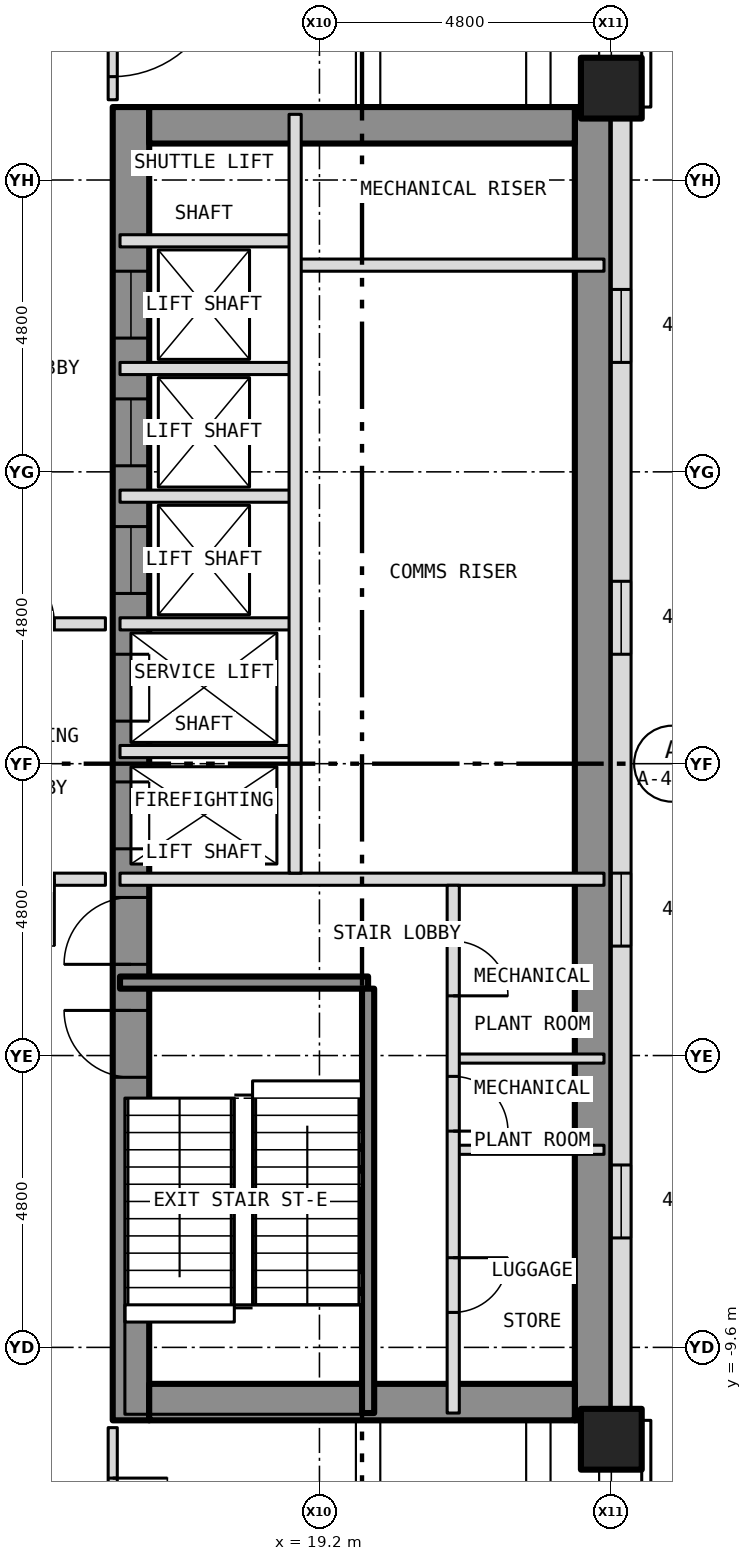
"""IFC4 building model, lengths in metres.
Left out: names, types, materials, properties, quantities, classifications, styles, units other than length and angle.
Written with IfcOpenShell. Run it as: python <this file> out.ifc"""

import sys

from ifc_helpers import new_model, si_unit, direction, frame, frame_2d, origin, origin_2d, place, context, subcontext, project, spatial, rectangle, hollow_rectangle, extrude, element, fill, save


model = new_model("IFC4")
c1 = context("Model", 3, precision=1e-05, world=origin(), true_north=direction((0.0, 1.0)))
c2 = subcontext(c1, "Body", "Model", "MODEL_VIEW")
j1 = project(units=[si_unit("LENGTHUNIT", "METRE"), si_unit("PLANEANGLEUNIT", "RADIAN")], contexts=[c1])
p1 = place(None, origin())
s1 = spatial("IfcSite", under=j1, at=p1, CompositionType="ELEMENT")
p2 = place(p1, origin())
s2 = spatial("IfcBuilding", under=s1, at=p2, CompositionType="ELEMENT")
p3 = place(p2, frame((0.0, 0.0, 84.5)))
s3 = spatial("IfcBuildingStorey", under=s2, at=p3, CompositionType="ELEMENT", Elevation=84.5)
for number, where, z_axis, x_axis in (
    (1, (24.0, -11.111, -0.3), (0.0, 0.0, 1.0), (1.0, 0.0, 0.0)),
    (2, (24.0, 11.111, -0.3), (0.0, 0.0, 1.0), (1.0, 0.0, 0.0)),
):
    element("IfcColumn", number, at=place(p3, frame(where, z_axis=z_axis, x_axis=x_axis)), inside=s3, PredefinedType="COLUMN", context=c2, shape_type="SweptSolid", body=[
        extrude(hollow_rectangle(XDim=1.0, YDim=1.0, WallThickness=0.06, at=origin_2d()), origin(), (0.0, 0.0, 1.0), 4.65),
    ])
p4 = place(p3, frame((16.1, -10.8, 0.0), z_axis=(0.0, 0.0, 1.0), x_axis=(0.0, 1.0, 0.0)))
e3 = element("IfcWall", 3, at=p4, inside=s3, PredefinedType="SHEAR", context=c2, shape_type="SweptSolid", body=[
    extrude(rectangle(XDim=21.6, YDim=0.6, at=frame_2d((10.8, 0.0))), origin(), (0.0, 0.0, 1.0), 3.9),
])
p5 = place(p4, frame((9.4, 0.0, 0.0)))
e4 = element("IfcOpeningElement", 4, at=p5, cuts=e3, PredefinedType="OPENING", context=c2, shape_type="SweptSolid", body=[
    extrude(rectangle(XDim=1.1, YDim=2.1, at=frame_2d((0.55, 1.05))), frame((0.0, 0.312, 0.0), z_axis=(0.0, -1.0, 0.0), x_axis=(1.0, 0.0, 0.0)), (0.0, 0.0, 1.0), 0.624),
])
p6 = place(p4, frame((11.5, 0.0, 0.0)))
e5 = element("IfcOpeningElement", 5, at=p6, cuts=e3, PredefinedType="OPENING", context=c2, shape_type="SweptSolid", body=[
    extrude(rectangle(XDim=1.1, YDim=2.1, at=frame_2d((0.55, 1.05))), frame((0.0, 0.312, 0.0), z_axis=(0.0, -1.0, 0.0), x_axis=(1.0, 0.0, 0.0)), (0.0, 0.0, 1.0), 0.624),
])
p7 = place(p4, frame((13.6, 0.0, 0.0)))
e6 = element("IfcOpeningElement", 6, at=p7, cuts=e3, PredefinedType="OPENING", context=c2, shape_type="SweptSolid", body=[
    extrude(rectangle(XDim=1.1, YDim=2.1, at=frame_2d((0.55, 1.05))), frame((0.0, 0.312, 0.0), z_axis=(0.0, -1.0, 0.0), x_axis=(1.0, 0.0, 0.0)), (0.0, 0.0, 1.0), 0.624),
])
p8 = place(p4, frame((15.7, 0.0, 0.0)))
e7 = element("IfcOpeningElement", 7, at=p8, cuts=e3, PredefinedType="OPENING", context=c2, shape_type="SweptSolid", body=[
    extrude(rectangle(XDim=1.1, YDim=2.1, at=frame_2d((0.55, 1.05))), frame((0.0, 0.312, 0.0), z_axis=(0.0, -1.0, 0.0), x_axis=(1.0, 0.0, 0.0)), (0.0, 0.0, 1.0), 0.624),
])
p9 = place(p4, frame((17.8, 0.0, 0.0)))
e8 = element("IfcOpeningElement", 8, at=p9, cuts=e3, PredefinedType="OPENING", context=c2, shape_type="SweptSolid", body=[
    extrude(rectangle(XDim=1.1, YDim=2.1, at=frame_2d((0.55, 1.05))), frame((0.0, 0.312, 0.0), z_axis=(0.0, -1.0, 0.0), x_axis=(1.0, 0.0, 0.0)), (0.0, 0.0, 1.0), 0.624),
])
p10 = place(p4, frame((5.642, 0.0, 0.0)))
e9 = element("IfcOpeningElement", 9, at=p10, cuts=e3, PredefinedType="OPENING", context=c2, shape_type="SweptSolid", body=[
    extrude(rectangle(XDim=1.1, YDim=2.1, at=frame_2d((0.55, 1.05))), frame((0.0, 0.312, 0.0), z_axis=(0.0, -1.0, 0.0), x_axis=(1.0, 0.0, 0.0)), (0.0, 0.0, 1.0), 0.624),
])
p11 = place(p4, frame((7.5, 0.0, 0.0)))
e10 = element("IfcOpeningElement", 10, at=p11, cuts=e3, PredefinedType="OPENING", context=c2, shape_type="SweptSolid", body=[
    extrude(rectangle(XDim=1.1, YDim=2.1, at=frame_2d((0.55, 1.05))), frame((0.0, 0.312, 0.0), z_axis=(0.0, -1.0, 0.0), x_axis=(1.0, 0.0, 0.0)), (0.0, 0.0, 1.0), 0.624),
])
p12 = place(p3, frame((23.7, -10.8, 0.0), z_axis=(0.0, 0.0, 1.0), x_axis=(0.0, 1.0, 0.0)))
e11 = element("IfcWall", 11, at=p12, inside=s3, PredefinedType="SHEAR", context=c2, shape_type="SweptSolid", body=[
    extrude(rectangle(XDim=21.6, YDim=0.6, at=frame_2d((10.8, 0.0))), origin(), (0.0, 0.0, 1.0), 3.9),
])
for number, where, z_axis, x_axis in (
    (12, (16.4, 10.5, 0.0), (0.0, 0.0, 1.0), (1.0, 0.0, 0.0)),
    (13, (16.4, -10.5, 0.0), (0.0, 0.0, 1.0), (1.0, 0.0, 0.0)),
):
    element("IfcWall", number, at=place(p3, frame(where, z_axis=z_axis, x_axis=x_axis)), inside=s3, PredefinedType="SHEAR", context=c2, shape_type="SweptSolid", body=[
        extrude(rectangle(XDim=7.0, YDim=0.6, at=frame_2d((3.5, 0.0))), origin(), (0.0, 0.0, 1.0), 3.9),
    ])
p13 = place(p3, frame((24.163, -10.8, 0.0), z_axis=(0.0, 0.0, 1.0), x_axis=(0.0, 1.0, 0.0)))
e14 = element("IfcWall", 14, at=p13, inside=s3, PredefinedType="SOLIDWALL", context=c2, shape_type="SweptSolid", body=[
    extrude(rectangle(XDim=21.6, YDim=0.325, at=frame_2d((10.8, 0.0))), origin(), (0.0, 0.0, 1.0), 4.5),
])
p14 = place(p13, frame((3.0, 0.0, 2.2)))
e15 = element("IfcOpeningElement", 15, at=p14, cuts=e14, PredefinedType="OPENING", context=c2, shape_type="SweptSolid", body=[
    extrude(rectangle(XDim=1.2, YDim=0.6, at=frame_2d((0.6, 0.3))), frame((0.0, 0.175, 0.0), z_axis=(0.0, -1.0, 0.0), x_axis=(1.0, 0.0, 0.0)), (0.0, 0.0, 1.0), 0.349),
])
p15 = place(p13, frame((7.8, 0.0, 2.2)))
e16 = element("IfcOpeningElement", 16, at=p15, cuts=e14, PredefinedType="OPENING", context=c2, shape_type="SweptSolid", body=[
    extrude(rectangle(XDim=1.2, YDim=0.6, at=frame_2d((0.6, 0.3))), frame((0.0, 0.175, 0.0), z_axis=(0.0, -1.0, 0.0), x_axis=(1.0, 0.0, 0.0)), (0.0, 0.0, 1.0), 0.349),
])
p16 = place(p13, frame((12.6, 0.0, 2.2)))
e17 = element("IfcOpeningElement", 17, at=p16, cuts=e14, PredefinedType="OPENING", context=c2, shape_type="SweptSolid", body=[
    extrude(rectangle(XDim=1.2, YDim=0.6, at=frame_2d((0.6, 0.3))), frame((0.0, 0.175, 0.0), z_axis=(0.0, -1.0, 0.0), x_axis=(1.0, 0.0, 0.0)), (0.0, 0.0, 1.0), 0.349),
])
p17 = place(p13, frame((17.4, 0.0, 2.2)))
e18 = element("IfcOpeningElement", 18, at=p17, cuts=e14, PredefinedType="OPENING", context=c2, shape_type="SweptSolid", body=[
    extrude(rectangle(XDim=1.2, YDim=0.6, at=frame_2d((0.6, 0.3))), frame((0.0, 0.175, 0.0), z_axis=(0.0, -1.0, 0.0), x_axis=(1.0, 0.0, 0.0)), (0.0, 0.0, 1.0), 0.349),
])
for number, where, z_axis, x_axis in (
    (19, (21.4, -6.35, 0.0), (0.0, 0.0, 1.0), (1.0, 0.0, 0.0)),
    (20, (21.4, -4.85, 0.0), (0.0, 0.0, 1.0), (1.0, 0.0, 0.0)),
):
    element("IfcWall", number, at=place(p3, frame(where, z_axis=z_axis, x_axis=x_axis)), inside=s3, PredefinedType="PARTITIONING", context=c2, shape_type="SweptSolid", body=[
        extrude(rectangle(XDim=2.48, YDim=0.15, at=frame_2d((1.24, 0.0))), origin(), (0.0, 0.0, 1.0), 3.9),
    ])
p18 = place(p3, frame((15.92, -3.6, 0.0), z_axis=(0.0, 0.0, 1.0), x_axis=(1.0, 0.0, 0.0)))
e21 = element("IfcWall", 21, at=p18, inside=s3, PredefinedType="SHEAR", context=c2, shape_type="SweptSolid", body=[
    extrude(rectangle(XDim=4.08, YDim=0.2, at=frame_2d((2.04, 0.0))), origin(), (0.0, 0.0, 1.0), 3.9),
])
p19 = place(p3, frame((12.4, -1.9, 0.0), z_axis=(0.0, 0.0, 1.0), x_axis=(1.0, 0.0, 0.0)))
e22 = element("IfcWall", 22, at=p19, inside=s3, PredefinedType="PARTITIONING", context=c2, shape_type="SweptSolid", body=[
    extrude(rectangle(XDim=3.28, YDim=0.2, at=frame_2d((1.64, 0.0))), origin(), (0.0, 0.0, 1.0), 4.35),
])
p20 = place(p19, frame((1.34, 0.0, 0.0)))
e23 = element("IfcOpeningElement", 23, at=p20, cuts=e22, PredefinedType="OPENING", context=c2, shape_type="SweptSolid", body=[
    extrude(rectangle(XDim=1.1, YDim=2.1, at=frame_2d((0.55, 1.05))), frame((0.0, 0.112, 0.0), z_axis=(0.0, -1.0, 0.0), x_axis=(1.0, 0.0, 0.0)), (0.0, 0.0, 1.0), 0.224),
])
p21 = place(p3, frame((15.92, -1.9, 0.0), z_axis=(0.0, 0.0, 1.0), x_axis=(1.0, 0.0, 0.0)))
e24 = element("IfcWall", 24, at=p21, inside=s3, PredefinedType="PARTITIONING", context=c2, shape_type="SweptSolid", body=[
    extrude(rectangle(XDim=7.96, YDim=0.2, at=frame_2d((3.98, 0.0))), origin(), (0.0, 0.0, 1.0), 3.9),
])
p22 = place(p3, frame((15.92, 0.2, 0.0), z_axis=(0.0, 0.0, 1.0), x_axis=(1.0, 0.0, 0.0)))
e25 = element("IfcWall", 25, at=p22, inside=s3, PredefinedType="PARTITIONING", context=c2, shape_type="SweptSolid", body=[
    extrude(rectangle(XDim=2.88, YDim=0.2, at=frame_2d((1.44, 0.0))), origin(), (0.0, 0.0, 1.0), 3.9),
])
p23 = place(p3, frame((12.4, 2.3, 0.0), z_axis=(0.0, 0.0, 1.0), x_axis=(1.0, 0.0, 0.0)))
e26 = element("IfcWall", 26, at=p23, inside=s3, PredefinedType="PARTITIONING", context=c2, shape_type="SweptSolid", body=[
    extrude(rectangle(XDim=3.28, YDim=0.2, at=frame_2d((1.64, 0.0))), origin(), (0.0, 0.0, 1.0), 4.35),
])
p24 = place(p23, frame((1.34, 0.0, 0.0)))
e27 = element("IfcOpeningElement", 27, at=p24, cuts=e26, PredefinedType="OPENING", context=c2, shape_type="SweptSolid", body=[
    extrude(rectangle(XDim=1.1, YDim=2.1, at=frame_2d((0.55, 1.05))), frame((0.0, 0.112, 0.0), z_axis=(0.0, -1.0, 0.0), x_axis=(1.0, 0.0, 0.0)), (0.0, 0.0, 1.0), 0.224),
])
for number, where, z_axis, x_axis in (
    (28, (15.92, 2.3, 0.0), (0.0, 0.0, 1.0), (1.0, 0.0, 0.0)),
    (29, (15.92, 4.4, 0.0), (0.0, 0.0, 1.0), (1.0, 0.0, 0.0)),
    (30, (15.92, 6.5, 0.0), (0.0, 0.0, 1.0), (1.0, 0.0, 0.0)),
):
    element("IfcWall", number, at=place(p3, frame(where, z_axis=z_axis, x_axis=x_axis)), inside=s3, PredefinedType="PARTITIONING", context=c2, shape_type="SweptSolid", body=[
        extrude(rectangle(XDim=2.88, YDim=0.2, at=frame_2d((1.44, 0.0))), origin(), (0.0, 0.0, 1.0), 3.9),
    ])
p25 = place(p3, frame((18.8, 8.2, 0.0), z_axis=(0.0, 0.0, 1.0), x_axis=(1.0, 0.0, 0.0)))
e31 = element("IfcWall", 31, at=p25, inside=s3, PredefinedType="PARTITIONING", context=c2, shape_type="SweptSolid", body=[
    extrude(rectangle(XDim=5.08, YDim=0.2, at=frame_2d((2.54, 0.0))), origin(), (0.0, 0.0, 1.0), 3.9),
])
p26 = place(p3, frame((15.92, 8.6, 0.0), z_axis=(0.0, 0.0, 1.0), x_axis=(1.0, 0.0, 0.0)))
e32 = element("IfcWall", 32, at=p26, inside=s3, PredefinedType="PARTITIONING", context=c2, shape_type="SweptSolid", body=[
    extrude(rectangle(XDim=2.88, YDim=0.2, at=frame_2d((1.44, 0.0))), origin(), (0.0, 0.0, 1.0), 3.9),
])
p27 = place(p3, frame((15.8, -15.725, 0.0), z_axis=(0.0, 0.0, 1.0), x_axis=(0.0, 1.0, 0.0)))
e33 = element("IfcWall", 33, at=p27, inside=s3, PredefinedType="PARTITIONING", context=c2, shape_type="SweptSolid", body=[
    extrude(rectangle(XDim=4.805, YDim=0.15, at=frame_2d((2.403, 0.0))), origin(), (0.0, 0.0, 1.0), 4.35),
])
p28 = place(p27, frame((3.075, 0.0, 0.0)))
e34 = element("IfcOpeningElement", 34, at=p28, cuts=e33, PredefinedType="OPENING", context=c2, shape_type="SweptSolid", body=[
    extrude(rectangle(XDim=0.9, YDim=2.1, at=frame_2d((0.45, 1.05))), frame((0.0, 0.087, 0.0), z_axis=(0.0, -1.0, 0.0), x_axis=(1.0, 0.0, 0.0)), (0.0, 0.0, 1.0), 0.174),
])
p29 = place(p3, frame((15.8, 10.92, 0.0), z_axis=(0.0, 0.0, 1.0), x_axis=(0.0, 1.0, 0.0)))
e35 = element("IfcWall", 35, at=p29, inside=s3, PredefinedType="PARTITIONING", context=c2, shape_type="SweptSolid", body=[
    extrude(rectangle(XDim=4.805, YDim=0.15, at=frame_2d((2.403, 0.0))), origin(), (0.0, 0.0, 1.0), 4.35),
])
p30 = place(p29, frame((0.38, 0.0, 0.0)))
e36 = element("IfcOpeningElement", 36, at=p30, cuts=e35, PredefinedType="OPENING", context=c2, shape_type="SweptSolid", body=[
    extrude(rectangle(XDim=1.8, YDim=2.1, at=frame_2d((0.9, 1.05))), frame((0.0, 0.087, 0.0), z_axis=(0.0, -1.0, 0.0), x_axis=(1.0, 0.0, 0.0)), (0.0, 0.0, 1.0), 0.174),
])
p31 = place(p3, frame((18.8, -1.8, 0.0), z_axis=(0.0, 0.0, 1.0), x_axis=(0.0, 1.0, 0.0)))
e37 = element("IfcWall", 37, at=p31, inside=s3, PredefinedType="PARTITIONING", context=c2, shape_type="SweptSolid", body=[
    extrude(rectangle(XDim=12.48, YDim=0.2, at=frame_2d((6.24, 0.0))), origin(), (0.0, 0.0, 1.0), 3.9),
])
p32 = place(p3, frame((20.0, -10.68, 0.0), z_axis=(0.0, 0.0, 1.0), x_axis=(0.0, 1.0, 0.0)))
e38 = element("IfcWall", 38, at=p32, inside=s3, PredefinedType="SHEAR", context=c2, shape_type="SweptSolid", body=[
    extrude(rectangle(XDim=6.98, YDim=0.2, at=frame_2d((3.49, 0.0))), origin(), (0.0, 0.0, 1.0), 3.9),
])
p33 = place(p3, frame((21.4, -10.68, 0.0), z_axis=(0.0, 0.0, 1.0), x_axis=(0.0, 1.0, 0.0)))
e39 = element("IfcWall", 39, at=p33, inside=s3, PredefinedType="PARTITIONING", context=c2, shape_type="SweptSolid", body=[
    extrude(rectangle(XDim=8.68, YDim=0.2, at=frame_2d((4.34, 0.0))), origin(), (0.0, 0.0, 1.0), 3.9),
])
p34 = place(p33, frame((1.655, 0.0, 0.0)))
e40 = element("IfcOpeningElement", 40, at=p34, cuts=e39, PredefinedType="OPENING", context=c2, shape_type="SweptSolid", body=[
    extrude(rectangle(XDim=0.9, YDim=2.1, at=frame_2d((0.45, 1.05))), frame((0.0, 0.112, 0.0), z_axis=(0.0, -1.0, 0.0), x_axis=(1.0, 0.0, 0.0)), (0.0, 0.0, 1.0), 0.224),
])
p35 = place(p33, frame((4.637, 0.0, 0.0)))
e41 = element("IfcOpeningElement", 41, at=p35, cuts=e39, PredefinedType="OPENING", context=c2, shape_type="SweptSolid", body=[
    extrude(rectangle(XDim=0.9, YDim=2.1, at=frame_2d((0.45, 1.05))), frame((0.0, 0.112, 0.0), z_axis=(0.0, -1.0, 0.0), x_axis=(1.0, 0.0, 0.0)), (0.0, 0.0, 1.0), 0.224),
])
p36 = place(p33, frame((6.862, 0.0, 0.0)))
e42 = element("IfcOpeningElement", 42, at=p36, cuts=e39, PredefinedType="OPENING", context=c2, shape_type="SweptSolid", body=[
    extrude(rectangle(XDim=0.9, YDim=2.1, at=frame_2d((0.45, 1.05))), frame((0.0, 0.112, 0.0), z_axis=(0.0, -1.0, 0.0), x_axis=(1.0, 0.0, 0.0)), (0.0, 0.0, 1.0), 0.224),
])
p37 = place(p14, origin())
e43 = element("IfcWindow", 43, at=p37, inside=s3, PartitioningType="SINGLE_PANEL", PredefinedType="WINDOW", context=c2, shape_type="SweptSolid", body=[
    extrude(rectangle(XDim=1.2, YDim=0.6, at=frame_2d((0.6, 0.3))), frame((0.0, -0.073, 0.0), z_axis=(0.0, -1.0, 0.0), x_axis=(1.0, 0.0, 0.0)), (0.0, 0.0, 1.0), 0.06),
])
fill(e15, e43)
p38 = place(p15, origin())
e44 = element("IfcWindow", 44, at=p38, inside=s3, PartitioningType="SINGLE_PANEL", PredefinedType="WINDOW", context=c2, shape_type="SweptSolid", body=[
    extrude(rectangle(XDim=1.2, YDim=0.6, at=frame_2d((0.6, 0.3))), frame((0.0, -0.073, 0.0), z_axis=(0.0, -1.0, 0.0), x_axis=(1.0, 0.0, 0.0)), (0.0, 0.0, 1.0), 0.06),
])
fill(e16, e44)
p39 = place(p16, origin())
e45 = element("IfcWindow", 45, at=p39, inside=s3, PartitioningType="SINGLE_PANEL", PredefinedType="WINDOW", context=c2, shape_type="SweptSolid", body=[
    extrude(rectangle(XDim=1.2, YDim=0.6, at=frame_2d((0.6, 0.3))), frame((0.0, -0.073, 0.0), z_axis=(0.0, -1.0, 0.0), x_axis=(1.0, 0.0, 0.0)), (0.0, 0.0, 1.0), 0.06),
])
fill(e17, e45)
p40 = place(p17, origin())
e46 = element("IfcWindow", 46, at=p40, inside=s3, PartitioningType="SINGLE_PANEL", PredefinedType="WINDOW", context=c2, shape_type="SweptSolid", body=[
    extrude(rectangle(XDim=1.2, YDim=0.6, at=frame_2d((0.6, 0.3))), frame((0.0, -0.073, 0.0), z_axis=(0.0, -1.0, 0.0), x_axis=(1.0, 0.0, 0.0)), (0.0, 0.0, 1.0), 0.06),
])
fill(e18, e46)
p41 = place(p5, origin())
e47 = element("IfcDoor", 47, at=p41, inside=s3, OperationType="SLIDING_TO_LEFT", PredefinedType="DOOR", context=c2, shape_type="SweptSolid", body=[
    extrude(rectangle(XDim=1.1, YDim=2.1, at=frame_2d((0.55, 1.05))), frame((0.0, 0.025, 0.0), z_axis=(0.0, -1.0, 0.0), x_axis=(1.0, 0.0, 0.0)), (0.0, 0.0, 1.0), 0.05),
])
fill(e4, e47)
p42 = place(p6, origin())
e48 = element("IfcDoor", 48, at=p42, inside=s3, OperationType="SLIDING_TO_LEFT", PredefinedType="DOOR", context=c2, shape_type="SweptSolid", body=[
    extrude(rectangle(XDim=1.1, YDim=2.1, at=frame_2d((0.55, 1.05))), frame((0.0, 0.025, 0.0), z_axis=(0.0, -1.0, 0.0), x_axis=(1.0, 0.0, 0.0)), (0.0, 0.0, 1.0), 0.05),
])
fill(e5, e48)
p43 = place(p7, origin())
e49 = element("IfcDoor", 49, at=p43, inside=s3, OperationType="SLIDING_TO_LEFT", PredefinedType="DOOR", context=c2, shape_type="SweptSolid", body=[
    extrude(rectangle(XDim=1.1, YDim=2.1, at=frame_2d((0.55, 1.05))), frame((0.0, 0.025, 0.0), z_axis=(0.0, -1.0, 0.0), x_axis=(1.0, 0.0, 0.0)), (0.0, 0.0, 1.0), 0.05),
])
fill(e6, e49)
p44 = place(p8, origin())
e50 = element("IfcDoor", 50, at=p44, inside=s3, OperationType="SLIDING_TO_LEFT", PredefinedType="DOOR", context=c2, shape_type="SweptSolid", body=[
    extrude(rectangle(XDim=1.1, YDim=2.1, at=frame_2d((0.55, 1.05))), frame((0.0, 0.025, 0.0), z_axis=(0.0, -1.0, 0.0), x_axis=(1.0, 0.0, 0.0)), (0.0, 0.0, 1.0), 0.05),
])
fill(e7, e50)
p45 = place(p9, origin())
e51 = element("IfcDoor", 51, at=p45, inside=s3, OperationType="SLIDING_TO_LEFT", PredefinedType="DOOR", context=c2, shape_type="SweptSolid", body=[
    extrude(rectangle(XDim=1.1, YDim=2.1, at=frame_2d((0.55, 1.05))), frame((0.0, 0.025, 0.0), z_axis=(0.0, -1.0, 0.0), x_axis=(1.0, 0.0, 0.0)), (0.0, 0.0, 1.0), 0.05),
])
fill(e8, e51)
p46 = place(p10, origin())
e52 = element("IfcDoor", 52, at=p46, inside=s3, OperationType="SINGLE_SWING_RIGHT", PredefinedType="DOOR", context=c2, shape_type="SweptSolid", body=[
    extrude(rectangle(XDim=1.1, YDim=2.1, at=frame_2d((0.55, 1.05))), frame((0.0, 0.025, 0.0), z_axis=(0.0, -1.0, 0.0), x_axis=(1.0, 0.0, 0.0)), (0.0, 0.0, 1.0), 0.05),
])
fill(e9, e52)
p47 = place(p11, origin())
e53 = element("IfcDoor", 53, at=p47, inside=s3, OperationType="SINGLE_SWING_LEFT", PredefinedType="DOOR", context=c2, shape_type="SweptSolid", body=[
    extrude(rectangle(XDim=1.1, YDim=2.1, at=frame_2d((0.55, 1.05))), frame((0.0, 0.025, 0.0), z_axis=(0.0, -1.0, 0.0), x_axis=(1.0, 0.0, 0.0)), (0.0, 0.0, 1.0), 0.05),
])
fill(e10, e53)
p48 = place(p34, origin())
e54 = element("IfcDoor", 54, at=p48, inside=s3, OperationType="SINGLE_SWING_RIGHT", PredefinedType="DOOR", context=c2, shape_type="SweptSolid", body=[
    extrude(rectangle(XDim=0.9, YDim=2.1, at=frame_2d((0.45, 1.05))), frame((0.0, 0.025, 0.0), z_axis=(0.0, -1.0, 0.0), x_axis=(1.0, 0.0, 0.0)), (0.0, 0.0, 1.0), 0.05),
])
fill(e40, e54)
p49 = place(p35, origin())
e55 = element("IfcDoor", 55, at=p49, inside=s3, OperationType="SINGLE_SWING_LEFT", PredefinedType="DOOR", context=c2, shape_type="SweptSolid", body=[
    extrude(rectangle(XDim=0.9, YDim=2.1, at=frame_2d((0.45, 1.05))), frame((0.0, 0.025, 0.0), z_axis=(0.0, -1.0, 0.0), x_axis=(1.0, 0.0, 0.0)), (0.0, 0.0, 1.0), 0.05),
])
fill(e41, e55)
p50 = place(p36, origin())
e56 = element("IfcDoor", 56, at=p50, inside=s3, OperationType="SINGLE_SWING_LEFT", PredefinedType="DOOR", context=c2, shape_type="SweptSolid", body=[
    extrude(rectangle(XDim=0.9, YDim=2.1, at=frame_2d((0.45, 1.05))), frame((0.0, 0.025, 0.0), z_axis=(0.0, -1.0, 0.0), x_axis=(1.0, 0.0, 0.0)), (0.0, 0.0, 1.0), 0.05),
])
fill(e42, e56)
p51 = place(p24, origin())
e57 = element("IfcDoor", 57, at=p51, inside=s3, OperationType="SINGLE_SWING_LEFT", PredefinedType="DOOR", context=c2, shape_type="SweptSolid", body=[
    extrude(rectangle(XDim=1.1, YDim=2.1, at=frame_2d((0.55, 1.05))), frame((0.0, 0.025, 0.0), z_axis=(0.0, -1.0, 0.0), x_axis=(1.0, 0.0, 0.0)), (0.0, 0.0, 1.0), 0.05),
])
fill(e27, e57)
p52 = place(p20, origin())
e58 = element("IfcDoor", 58, at=p52, inside=s3, OperationType="SINGLE_SWING_RIGHT", PredefinedType="DOOR", context=c2, shape_type="SweptSolid", body=[
    extrude(rectangle(XDim=1.1, YDim=2.1, at=frame_2d((0.55, 1.05))), frame((0.0, 0.025, 0.0), z_axis=(0.0, -1.0, 0.0), x_axis=(1.0, 0.0, 0.0)), (0.0, 0.0, 1.0), 0.05),
])
fill(e23, e58)
p53 = place(p28, origin())
e59 = element("IfcDoor", 59, at=p53, inside=s3, OperationType="SINGLE_SWING_RIGHT", PredefinedType="DOOR", context=c2, shape_type="SweptSolid", body=[
    extrude(rectangle(XDim=0.9, YDim=2.1, at=frame_2d((0.45, 1.05))), frame((0.0, 0.025, 0.0), z_axis=(0.0, -1.0, 0.0), x_axis=(1.0, 0.0, 0.0)), (0.0, 0.0, 1.0), 0.05),
])
fill(e34, e59)
p54 = place(p30, origin())
e60 = element("IfcDoor", 60, at=p54, inside=s3, OperationType="DOUBLE_DOOR_SINGLE_SWING", PredefinedType="DOOR", context=c2, shape_type="SweptSolid", body=[
    extrude(rectangle(XDim=1.8, YDim=2.1, at=frame_2d((0.9, 1.05))), frame((0.0, 0.025, 0.0), z_axis=(0.0, -1.0, 0.0), x_axis=(1.0, 0.0, 0.0)), (0.0, 0.0, 1.0), 0.05),
])
fill(e36, e60)
save(model, sys.argv[1])
